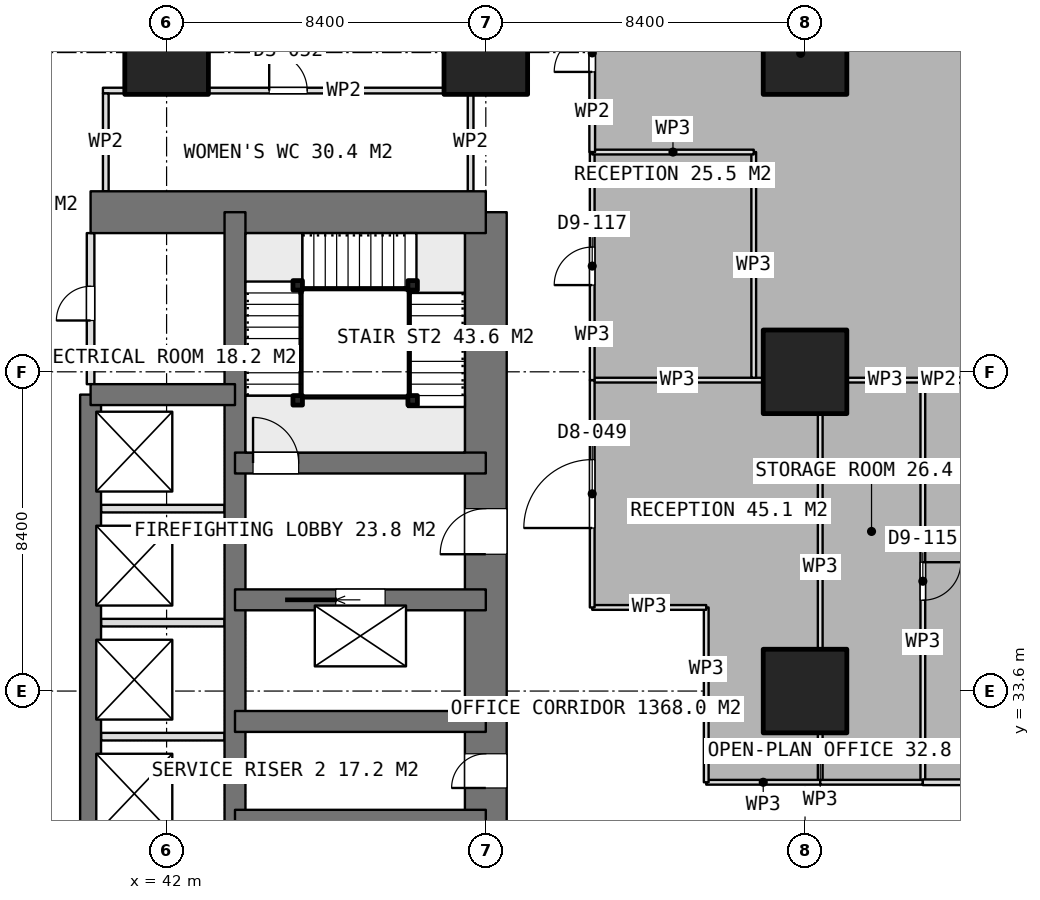
"""IFC4 building model, lengths in metres.
Left out: names, types, materials, properties, quantities, classifications, styles, units other than length and angle.
Written with IfcOpenShell. Run it as: python <this file> out.ifc"""

import sys

from ifc_helpers import new_model, si_unit, direction, frame, frame_2d, origin, origin_2d, place, context, subcontext, project, spatial, rectangle, extrude, element, fill, save


model = new_model("IFC4")
c1 = context("Model", 3, precision=1e-05, world=origin(), true_north=direction((0.0, 1.0)))
c2 = subcontext(c1, "Body", "Model", "MODEL_VIEW")
j1 = project(units=[si_unit("LENGTHUNIT", "METRE"), si_unit("PLANEANGLEUNIT", "RADIAN")], contexts=[c1])
p1 = place(None, origin())
s1 = spatial("IfcSite", under=j1, at=p1, CompositionType="ELEMENT")
p2 = place(p1, origin())
s2 = spatial("IfcBuilding", under=s1, at=p2, CompositionType="ELEMENT")
p3 = place(p2, frame((0.0, 0.0, 44.15)))
s3 = spatial("IfcBuildingStorey", under=s2, at=p3, CompositionType="ELEMENT", Elevation=44.15)
p4 = place(p3, frame((40.0, 46.2, 0.0), z_axis=(0.0, 0.0, 1.0), x_axis=(1.0, 0.0, 0.0)))
e1 = element("IfcWall", 1, at=p4, inside=s3, PredefinedType="SHEAR", context=c2, shape_type="SweptSolid", body=[
    extrude(rectangle(XDim=10.4, YDim=1.1, at=frame_2d((5.2, 0.0))), origin(), (0.0, 0.0, 1.0), 3.75),
])
p5 = place(p3, frame((50.4, 21.0, 0.0), z_axis=(0.0, 0.0, 1.0), x_axis=(0.0, 1.0, 0.0)))
e2 = element("IfcWall", 2, at=p5, inside=s3, PredefinedType="SHEAR", context=c2, shape_type="SweptSolid", body=[
    extrude(rectangle(XDim=25.2, YDim=1.1, at=frame_2d((12.6, 0.0))), origin(), (0.0, 0.0, 1.0), 3.75),
])
p6 = place(p5, frame((16.2, 0.0, 0.0)))
e3 = element("IfcOpeningElement", 3, at=p6, cuts=e2, PredefinedType="OPENING", context=c2, shape_type="SweptSolid", body=[
    extrude(rectangle(XDim=1.2, YDim=2.1, at=frame_2d((0.6, 1.05))), frame((0.0, 0.56, 0.0), z_axis=(0.0, -1.0, 0.0), x_axis=(1.0, 0.0, 0.0)), (0.0, 0.0, 1.0), 1.12),
])
p7 = place(p5, frame((10.05, 0.0, 0.0)))
e4 = element("IfcOpeningElement", 4, at=p7, cuts=e2, PredefinedType="OPENING", context=c2, shape_type="SweptSolid", body=[
    extrude(rectangle(XDim=0.9, YDim=2.1, at=frame_2d((0.45, 1.05))), frame((0.0, 0.56, 0.0), z_axis=(0.0, -1.0, 0.0), x_axis=(1.0, 0.0, 0.0)), (0.0, 0.0, 1.0), 1.12),
])
p8 = place(p5, frame((7.45, 0.0, 0.0)))
e5 = element("IfcOpeningElement", 5, at=p8, cuts=e2, PredefinedType="OPENING", context=c2, shape_type="SweptSolid", body=[
    extrude(rectangle(XDim=0.9, YDim=2.1, at=frame_2d((0.45, 1.05))), frame((0.0, 0.56, 0.0), z_axis=(0.0, -1.0, 0.0), x_axis=(1.0, 0.0, 0.0)), (0.0, 0.0, 1.0), 1.12),
])
p9 = place(p5, frame((0.75, 0.0, 0.0)))
e6 = element("IfcOpeningElement", 6, at=p9, cuts=e2, PredefinedType="OPENING", context=c2, shape_type="SweptSolid", body=[
    extrude(rectangle(XDim=1.2, YDim=2.1, at=frame_2d((0.6, 1.05))), frame((0.0, 0.56, 0.0), z_axis=(0.0, -1.0, 0.0), x_axis=(1.0, 0.0, 0.0)), (0.0, 0.0, 1.0), 1.12),
])
p10 = place(p3, frame((43.8, 21.0, 0.0), z_axis=(0.0, 0.0, 1.0), x_axis=(0.0, 1.0, 0.0)))
e7 = element("IfcWall", 7, at=p10, inside=s3, PredefinedType="SHEAR", context=c2, shape_type="SweptSolid", body=[
    extrude(rectangle(XDim=25.2, YDim=0.55, at=frame_2d((12.6, 0.0))), origin(), (0.0, 0.0, 1.0), 3.75),
])
p11 = place(p3, frame((40.0, 23.4, 0.0), z_axis=(0.0, 0.0, 1.0), x_axis=(0.0, 1.0, 0.0)))
e8 = element("IfcWall", 8, at=p11, inside=s3, PredefinedType="SHEAR", context=c2, shape_type="SweptSolid", body=[
    extrude(rectangle(XDim=18.0, YDim=0.55, at=frame_2d((9.0, 0.0))), origin(), (0.0, 0.0, 1.0), 3.75),
])
p12 = place(p3, frame((40.0, 41.4, 0.0), z_axis=(0.0, 0.0, 1.0), x_axis=(1.0, 0.0, 0.0)))
e9 = element("IfcWall", 9, at=p12, inside=s3, PredefinedType="SHEAR", context=c2, shape_type="SweptSolid", body=[
    extrude(rectangle(XDim=3.8, YDim=0.55, at=frame_2d((1.9, 0.0))), origin(), (0.0, 0.0, 1.0), 3.75),
])
for number, where, z_axis, x_axis in (
    (10, (43.8, 30.2, 0.0), (0.0, 0.0, 1.0), (1.0, 0.0, 0.0)),
    (11, (43.8, 32.8, 0.0), (0.0, 0.0, 1.0), (1.0, 0.0, 0.0)),
):
    element("IfcWall", number, at=place(p3, frame(where, z_axis=z_axis, x_axis=x_axis)), inside=s3, PredefinedType="SHEAR", context=c2, shape_type="SweptSolid", body=[
        extrude(rectangle(XDim=6.6, YDim=0.55, at=frame_2d((3.3, 0.0))), origin(), (0.0, 0.0, 1.0), 3.75),
    ])
p13 = place(p3, frame((43.8, 36.0, 0.0), z_axis=(0.0, 0.0, 1.0), x_axis=(1.0, 0.0, 0.0)))
e12 = element("IfcWall", 12, at=p13, inside=s3, PredefinedType="SHEAR", context=c2, shape_type="SweptSolid", body=[
    extrude(rectangle(XDim=6.6, YDim=0.55, at=frame_2d((3.3, 0.0))), origin(), (0.0, 0.0, 1.0), 3.75),
])
p14 = place(p13, frame((2.65, 0.0, 0.0)))
e13 = element("IfcOpeningElement", 13, at=p14, cuts=e12, PredefinedType="OPENING", context=c2, shape_type="SweptSolid", body=[
    extrude(rectangle(XDim=1.3, YDim=2.1, at=frame_2d((0.65, 1.05))), frame((0.0, 0.285, 0.0), z_axis=(0.0, -1.0, 0.0), x_axis=(1.0, 0.0, 0.0)), (0.0, 0.0, 1.0), 0.57),
])
p15 = place(p3, frame((43.8, 39.6, 0.0), z_axis=(0.0, 0.0, 1.0), x_axis=(1.0, 0.0, 0.0)))
e14 = element("IfcWall", 14, at=p15, inside=s3, PredefinedType="SHEAR", context=c2, shape_type="SweptSolid", body=[
    extrude(rectangle(XDim=6.6, YDim=0.55, at=frame_2d((3.3, 0.0))), origin(), (0.0, 0.0, 1.0), 3.75),
])
p16 = place(p15, frame((0.475, 0.0, 0.0)))
e15 = element("IfcOpeningElement", 15, at=p16, cuts=e14, PredefinedType="OPENING", context=c2, shape_type="SweptSolid", body=[
    extrude(rectangle(XDim=1.2, YDim=2.1, at=frame_2d((0.6, 1.05))), frame((0.0, 0.285, 0.0), z_axis=(0.0, -1.0, 0.0), x_axis=(1.0, 0.0, 0.0)), (0.0, 0.0, 1.0), 0.57),
])
for number, where, z_axis, x_axis in (
    (16, (42.0, 50.4, 0.0), (0.0, 0.0, 1.0), (1.0, 0.0, 0.0)),
    (17, (50.4, 50.4, 0.0), (0.0, 0.0, 1.0), (1.0, 0.0, 0.0)),
    (18, (58.8, 33.6, 0.0), (0.0, 0.0, 1.0), (1.0, 0.0, 0.0)),
    (19, (58.8, 42.0, 0.0), (0.0, 0.0, 1.0), (1.0, 0.0, 0.0)),
    (20, (58.8, 50.4, 0.0), (0.0, 0.0, 1.0), (1.0, 0.0, 0.0)),
):
    element("IfcColumn", number, at=place(p3, frame(where, z_axis=z_axis, x_axis=x_axis)), inside=s3, PredefinedType="COLUMN", context=c2, shape_type="SweptSolid", body=[
        extrude(rectangle(XDim=2.2, YDim=2.2, at=origin_2d()), origin(), (0.0, 0.0, 1.0), 3.75),
    ])
for number, where, z_axis, x_axis in (
    (21, (40.275, 32.4, 0.0), (0.0, 0.0, 1.0), (1.0, 0.0, 0.0)),
    (22, (40.275, 35.4, 0.0), (0.0, 0.0, 1.0), (1.0, 0.0, 0.0)),
    (23, (40.275, 38.4, 0.0), (0.0, 0.0, 1.0), (1.0, 0.0, 0.0)),
):
    element("IfcWall", number, at=place(p3, frame(where, z_axis=z_axis, x_axis=x_axis)), inside=s3, PredefinedType="PARTITIONING", context=c2, shape_type="SweptSolid", body=[
        extrude(rectangle(XDim=3.25, YDim=0.2, at=frame_2d((1.625, 0.0))), origin(), (0.0, 0.0, 1.0), 3.5),
    ])
p17 = place(p3, frame((40.0, 41.675, 0.0), z_axis=(0.0, 0.0, 1.0), x_axis=(0.0, 1.0, 0.0)))
e24 = element("IfcWall", 24, at=p17, inside=s3, PredefinedType="PARTITIONING", context=c2, shape_type="SweptSolid", body=[
    extrude(rectangle(XDim=3.975, YDim=0.2, at=frame_2d((1.987, 0.0))), origin(), (0.0, 0.0, 1.0), 3.5),
])
p18 = place(p17, frame((1.675, 0.0, 0.0)))
e25 = element("IfcOpeningElement", 25, at=p18, cuts=e24, PredefinedType="OPENING", context=c2, shape_type="SweptSolid", body=[
    extrude(rectangle(XDim=0.9, YDim=2.1, at=frame_2d((0.45, 1.05))), frame((0.0, 0.11, 0.0), z_axis=(0.0, -1.0, 0.0), x_axis=(1.0, 0.0, 0.0)), (0.0, 0.0, 1.0), 0.22),
])
p19 = place(p3, frame((40.325, 49.4, 0.0), z_axis=(0.0, 0.0, 1.0), x_axis=(1.0, 0.0, 0.0)))
e26 = element("IfcWall", 26, at=p19, inside=s3, PredefinedType="PARTITIONING", context=c2, shape_type="SweptSolid", body=[
    extrude(rectangle(XDim=9.75, YDim=0.15, at=frame_2d((4.875, 0.0))), origin(), (0.0, 0.0, 1.0), 3.5),
])
p20 = place(p19, frame((4.375, 0.0, 0.0)))
e27 = element("IfcOpeningElement", 27, at=p20, cuts=e26, PredefinedType="OPENING", context=c2, shape_type="SweptSolid", body=[
    extrude(rectangle(XDim=1.0, YDim=2.1, at=frame_2d((0.5, 1.05))), frame((0.0, 0.085, 0.0), z_axis=(0.0, -1.0, 0.0), x_axis=(1.0, 0.0, 0.0)), (0.0, 0.0, 1.0), 0.17),
])
for number, where, z_axis, x_axis in (
    (28, (40.4, 46.75, 0.0), (0.0, 0.0, 1.0), (0.0, 1.0, 0.0)),
    (29, (50.0, 46.75, 0.0), (0.0, 0.0, 1.0), (0.0, 1.0, 0.0)),
):
    element("IfcWall", number, at=place(p3, frame(where, z_axis=z_axis, x_axis=x_axis)), inside=s3, PredefinedType="PARTITIONING", context=c2, shape_type="SweptSolid", body=[
        extrude(rectangle(XDim=2.575, YDim=0.15, at=frame_2d((1.288, 0.0))), origin(), (0.0, 0.0, 1.0), 3.5),
    ])
p21 = place(p3, frame((53.2, 41.781, 0.0), z_axis=(0.0, 0.0, 1.0), x_axis=(1.0, 0.0, 0.0)))
e30 = element("IfcWall", 30, at=p21, inside=s3, PredefinedType="PARTITIONING", context=c2, shape_type="SweptSolid", body=[
    extrude(rectangle(XDim=4.48, YDim=0.125, at=frame_2d((2.24, 0.0))), origin(), (0.0, 0.0, 1.0), 3.5),
])
p22 = place(p3, frame((59.2, 40.88, 0.0), z_axis=(0.0, 0.0, 1.0), x_axis=(0.0, -1.0, 0.0)))
e31 = element("IfcWall", 31, at=p22, inside=s3, PredefinedType="PARTITIONING", context=c2, shape_type="SweptSolid", body=[
    extrude(rectangle(XDim=6.16, YDim=0.125, at=frame_2d((3.08, 0.0))), origin(), (0.0, 0.0, 1.0), 3.5),
])
p23 = place(p3, frame((59.2, 32.48, 0.0), z_axis=(0.0, 0.0, 1.0), x_axis=(0.0, -1.0, 0.0)))
e32 = element("IfcWall", 32, at=p23, inside=s3, PredefinedType="PARTITIONING", context=c2, shape_type="SweptSolid", body=[
    extrude(rectangle(XDim=1.28, YDim=0.125, at=frame_2d((0.64, 0.0))), origin(), (0.0, 0.0, 1.0), 3.5),
])
p24 = place(p3, frame((59.2, 31.2, 0.0), z_axis=(0.0, 0.0, 1.0), x_axis=(-1.0, 0.0, 0.0)))
e33 = element("IfcWall", 33, at=p24, inside=s3, PredefinedType="PARTITIONING", context=c2, shape_type="SweptSolid", body=[
    extrude(rectangle(XDim=3.0, YDim=0.125, at=frame_2d((1.5, 0.0))), origin(), (0.0, 0.0, 1.0), 3.5),
])
p25 = place(p3, frame((56.2, 31.2, 0.0), z_axis=(0.0, 0.0, 1.0), x_axis=(0.0, 1.0, 0.0)))
e34 = element("IfcWall", 34, at=p25, inside=s3, PredefinedType="PARTITIONING", context=c2, shape_type="SweptSolid", body=[
    extrude(rectangle(XDim=4.6, YDim=0.125, at=frame_2d((2.3, 0.0))), origin(), (0.0, 0.0, 1.0), 3.5),
])
p26 = place(p3, frame((56.2, 35.8, 0.0), z_axis=(0.0, 0.0, 1.0), x_axis=(-1.0, 0.0, 0.0)))
e35 = element("IfcWall", 35, at=p26, inside=s3, PredefinedType="PARTITIONING", context=c2, shape_type="SweptSolid", body=[
    extrude(rectangle(XDim=3.0, YDim=0.125, at=frame_2d((1.5, 0.0))), origin(), (0.0, 0.0, 1.0), 3.5),
])
p27 = place(p3, frame((53.2, 35.8, 0.0), z_axis=(0.0, 0.0, 1.0), x_axis=(0.0, 1.0, 0.0)))
e36 = element("IfcWall", 36, at=p27, inside=s3, PredefinedType="PARTITIONING", context=c2, shape_type="SweptSolid", body=[
    extrude(rectangle(XDim=5.981, YDim=0.125, at=frame_2d((2.99, 0.0))), origin(), (0.0, 0.0, 1.0), 3.5),
])
p28 = place(p27, frame((2.09, 0.0, 0.0)))
e37 = element("IfcOpeningElement", 37, at=p28, cuts=e36, PredefinedType="OPENING", context=c2, shape_type="SweptSolid", body=[
    extrude(rectangle(XDim=1.8, YDim=2.1, at=frame_2d((0.9, 1.05))), frame((0.0, 0.073, 0.0), z_axis=(0.0, -1.0, 0.0), x_axis=(1.0, 0.0, 0.0)), (0.0, 0.0, 1.0), 0.145),
])
p29 = place(p3, frame((59.92, 41.781, 0.0), z_axis=(0.0, 0.0, 1.0), x_axis=(1.0, 0.0, 0.0)))
e38 = element("IfcWall", 38, at=p29, inside=s3, PredefinedType="PARTITIONING", context=c2, shape_type="SweptSolid", body=[
    extrude(rectangle(XDim=1.98, YDim=0.125, at=frame_2d((0.99, 0.0))), origin(), (0.0, 0.0, 1.0), 3.5),
])
p30 = place(p3, frame((61.9, 41.781, 0.0), z_axis=(0.0, 0.0, 1.0), x_axis=(0.0, -1.0, 0.0)))
e39 = element("IfcWall", 39, at=p30, inside=s3, PredefinedType="PARTITIONING", context=c2, shape_type="SweptSolid", body=[
    extrude(rectangle(XDim=10.581, YDim=0.125, at=frame_2d((5.291, 0.0))), origin(), (0.0, 0.0, 1.0), 3.5),
])
p31 = place(p30, frame((4.791, 0.0, 0.0)))
e40 = element("IfcOpeningElement", 40, at=p31, cuts=e39, PredefinedType="OPENING", context=c2, shape_type="SweptSolid", body=[
    extrude(rectangle(XDim=1.0, YDim=2.1, at=frame_2d((0.5, 1.05))), frame((0.0, 0.073, 0.0), z_axis=(0.0, -1.0, 0.0), x_axis=(1.0, 0.0, 0.0)), (0.0, 0.0, 1.0), 0.145),
])
p32 = place(p3, frame((61.9, 31.2, 0.0), z_axis=(0.0, 0.0, 1.0), x_axis=(-1.0, 0.0, 0.0)))
e41 = element("IfcWall", 41, at=p32, inside=s3, PredefinedType="PARTITIONING", context=c2, shape_type="SweptSolid", body=[
    extrude(rectangle(XDim=2.7, YDim=0.125, at=frame_2d((1.35, 0.0))), origin(), (0.0, 0.0, 1.0), 3.5),
])
p33 = place(p3, frame((64.991, 31.2, 0.0), z_axis=(0.0, 0.0, 1.0), x_axis=(-1.0, 0.0, 0.0)))
e42 = element("IfcWall", 42, at=p33, inside=s3, PredefinedType="PARTITIONING", context=c2, shape_type="SweptSolid", body=[
    extrude(rectangle(XDim=3.091, YDim=0.15, at=frame_2d((1.545, 0.0))), origin(), (0.0, 0.0, 1.0), 3.5),
])
p34 = place(p3, frame((61.9, 41.781, 0.0), z_axis=(0.0, 0.0, 1.0), x_axis=(1.0, 0.0, 0.0)))
e43 = element("IfcWall", 43, at=p34, inside=s3, PredefinedType="PARTITIONING", context=c2, shape_type="SweptSolid", body=[
    extrude(rectangle(XDim=4.18, YDim=0.15, at=frame_2d((2.09, 0.0))), origin(), (0.0, 0.0, 1.0), 3.5),
])
p35 = place(p34, frame((1.555, 0.0, 0.0)))
e44 = element("IfcOpeningElement", 44, at=p35, cuts=e43, PredefinedType="OPENING", context=c2, shape_type="SweptSolid", body=[
    extrude(rectangle(XDim=1.0, YDim=2.1, at=frame_2d((0.5, 1.05))), frame((0.0, 0.085, 0.0), z_axis=(0.0, -1.0, 0.0), x_axis=(1.0, 0.0, 0.0)), (0.0, 0.0, 1.0), 0.17),
])
p36 = place(p3, frame((57.45, 47.782, 0.0), z_axis=(0.0, 0.0, 1.0), x_axis=(0.0, -1.0, 0.0)))
e45 = element("IfcWall", 45, at=p36, inside=s3, PredefinedType="PARTITIONING", context=c2, shape_type="SweptSolid", body=[
    extrude(rectangle(XDim=5.939, YDim=0.125, at=frame_2d((2.969, 0.0))), origin(), (0.0, 0.0, 1.0), 3.5),
])
p37 = place(p3, frame((53.2, 41.782, 0.0), z_axis=(0.0, 0.0, 1.0), x_axis=(0.0, 1.0, 0.0)))
e46 = element("IfcWall", 46, at=p37, inside=s3, PredefinedType="PARTITIONING", context=c2, shape_type="SweptSolid", body=[
    extrude(rectangle(XDim=6.0, YDim=0.125, at=frame_2d((3.0, 0.0))), origin(), (0.0, 0.0, 1.0), 3.5),
])
p38 = place(p37, frame((2.5, 0.0, 0.0)))
e47 = element("IfcOpeningElement", 47, at=p38, cuts=e46, PredefinedType="OPENING", context=c2, shape_type="SweptSolid", body=[
    extrude(rectangle(XDim=1.0, YDim=2.1, at=frame_2d((0.5, 1.05))), frame((0.0, 0.073, 0.0), z_axis=(0.0, -1.0, 0.0), x_axis=(1.0, 0.0, 0.0)), (0.0, 0.0, 1.0), 0.145),
])
p39 = place(p3, frame((53.2, 47.782, 0.0), z_axis=(0.0, 0.0, 1.0), x_axis=(1.0, 0.0, 0.0)))
e48 = element("IfcWall", 48, at=p39, inside=s3, PredefinedType="PARTITIONING", context=c2, shape_type="SweptSolid", body=[
    extrude(rectangle(XDim=4.25, YDim=0.125, at=frame_2d((2.125, 0.0))), origin(), (0.0, 0.0, 1.0), 3.5),
])
p40 = place(p3, frame((53.2, 47.782, 0.0), z_axis=(0.0, 0.0, 1.0), x_axis=(0.0, 1.0, 0.0)))
e49 = element("IfcWall", 49, at=p40, inside=s3, PredefinedType="PARTITIONING", context=c2, shape_type="SweptSolid", body=[
    extrude(rectangle(XDim=5.218, YDim=0.15, at=frame_2d((2.609, 0.0))), origin(), (0.0, 0.0, 1.0), 3.5),
])
p41 = place(p40, frame((2.109, 0.0, 0.0)))
e50 = element("IfcOpeningElement", 50, at=p41, cuts=e49, PredefinedType="OPENING", context=c2, shape_type="SweptSolid", body=[
    extrude(rectangle(XDim=1.0, YDim=2.1, at=frame_2d((0.5, 1.05))), frame((0.0, 0.085, 0.0), z_axis=(0.0, -1.0, 0.0), x_axis=(1.0, 0.0, 0.0)), (0.0, 0.0, 1.0), 0.17),
])
for number, where, z_axis, x_axis in (
    (51, (45.45, 41.25, 0.0), (0.0, 0.0, 1.0), (1.0, 0.0, 0.0)),
    (52, (45.45, 44.275, 0.0), (0.0, 0.0, 1.0), (1.0, 0.0, 0.0)),
    (53, (48.475, 44.275, 0.0), (0.0, 0.0, 1.0), (1.0, 0.0, 0.0)),
    (54, (48.475, 41.25, 0.0), (0.0, 0.0, 1.0), (1.0, 0.0, 0.0)),
):
    element("IfcColumn", number, at=place(p3, frame(where, z_axis=z_axis, x_axis=x_axis)), inside=s3, PredefinedType="COLUMN", context=c2, shape_type="SweptSolid", body=[
        extrude(rectangle(XDim=0.25, YDim=0.25, at=origin_2d()), origin(), (0.0, 0.0, 1.0), 3.75),
    ])
p42 = place(p6, origin())
e55 = element("IfcDoor", 55, at=p42, inside=s3, OperationType="SINGLE_SWING_LEFT", PredefinedType="DOOR", context=c2, shape_type="SweptSolid", body=[
    extrude(rectangle(XDim=1.2, YDim=2.1, at=frame_2d((0.6, 1.05))), frame((0.0, 0.025, 0.0), z_axis=(0.0, -1.0, 0.0), x_axis=(1.0, 0.0, 0.0)), (0.0, 0.0, 1.0), 0.05),
])
fill(e3, e55)
p43 = place(p7, origin())
e56 = element("IfcDoor", 56, at=p43, inside=s3, OperationType="SINGLE_SWING_LEFT", PredefinedType="DOOR", context=c2, shape_type="SweptSolid", body=[
    extrude(rectangle(XDim=0.9, YDim=2.1, at=frame_2d((0.45, 1.05))), frame((0.0, 0.025, 0.0), z_axis=(0.0, -1.0, 0.0), x_axis=(1.0, 0.0, 0.0)), (0.0, 0.0, 1.0), 0.05),
])
fill(e4, e56)
p44 = place(p18, origin())
e57 = element("IfcDoor", 57, at=p44, inside=s3, OperationType="SINGLE_SWING_LEFT", PredefinedType="DOOR", context=c2, shape_type="SweptSolid", body=[
    extrude(rectangle(XDim=0.9, YDim=2.1, at=frame_2d((0.45, 1.05))), frame((0.0, 0.025, 0.0), z_axis=(0.0, -1.0, 0.0), x_axis=(1.0, 0.0, 0.0)), (0.0, 0.0, 1.0), 0.05),
])
fill(e25, e57)
p45 = place(p14, origin())
e58 = element("IfcDoor", 58, at=p45, inside=s3, OperationType="SLIDING_TO_LEFT", PredefinedType="USERDEFINED", context=c2, shape_type="SweptSolid", body=[
    extrude(rectangle(XDim=1.3, YDim=2.1, at=frame_2d((0.65, 1.05))), frame((0.0, 0.025, 0.0), z_axis=(0.0, -1.0, 0.0), x_axis=(1.0, 0.0, 0.0)), (0.0, 0.0, 1.0), 0.05),
])
fill(e13, e58)
p46 = place(p20, origin())
e59 = element("IfcDoor", 59, at=p46, inside=s3, OperationType="SINGLE_SWING_LEFT", PredefinedType="DOOR", context=c2, shape_type="SweptSolid", body=[
    extrude(rectangle(XDim=1.0, YDim=2.1, at=frame_2d((0.5, 1.05))), frame((0.0, 0.025, 0.0), z_axis=(0.0, -1.0, 0.0), x_axis=(1.0, 0.0, 0.0)), (0.0, 0.0, 1.0), 0.05),
])
fill(e27, e59)
p47 = place(p28, origin())
e60 = element("IfcDoor", 60, at=p47, inside=s3, OperationType="DOUBLE_DOOR_SINGLE_SWING", PredefinedType="DOOR", context=c2, shape_type="SweptSolid", body=[
    extrude(rectangle(XDim=1.8, YDim=2.1, at=frame_2d((0.9, 1.05))), frame((0.0, 0.025, 0.0), z_axis=(0.0, -1.0, 0.0), x_axis=(1.0, 0.0, 0.0)), (0.0, 0.0, 1.0), 0.05),
])
fill(e37, e60)
p48 = place(p31, origin())
e61 = element("IfcDoor", 61, at=p48, inside=s3, OperationType="SINGLE_SWING_LEFT", PredefinedType="DOOR", context=c2, shape_type="SweptSolid", body=[
    extrude(rectangle(XDim=1.0, YDim=2.1, at=frame_2d((0.5, 1.05))), frame((0.0, 0.025, 0.0), z_axis=(0.0, -1.0, 0.0), x_axis=(1.0, 0.0, 0.0)), (0.0, 0.0, 1.0), 0.05),
])
fill(e40, e61)
p49 = place(p38, origin())
e62 = element("IfcDoor", 62, at=p49, inside=s3, OperationType="SINGLE_SWING_LEFT", PredefinedType="DOOR", context=c2, shape_type="SweptSolid", body=[
    extrude(rectangle(XDim=1.0, YDim=2.1, at=frame_2d((0.5, 1.05))), frame((0.0, 0.025, 0.0), z_axis=(0.0, -1.0, 0.0), x_axis=(1.0, 0.0, 0.0)), (0.0, 0.0, 1.0), 0.05),
])
fill(e47, e62)
p50 = place(p41, origin())
e63 = element("IfcDoor", 63, at=p50, inside=s3, OperationType="SINGLE_SWING_LEFT", PredefinedType="DOOR", context=c2, shape_type="SweptSolid", body=[
    extrude(rectangle(XDim=1.0, YDim=2.1, at=frame_2d((0.5, 1.05))), frame((0.0, 0.025, 0.0), z_axis=(0.0, -1.0, 0.0), x_axis=(1.0, 0.0, 0.0)), (0.0, 0.0, 1.0), 0.05),
])
fill(e50, e63)
p51 = place(p16, origin())
e64 = element("IfcDoor", 64, at=p51, inside=s3, OperationType="SINGLE_SWING_RIGHT", PredefinedType="DOOR", context=c2, shape_type="SweptSolid", body=[
    extrude(rectangle(XDim=1.2, YDim=2.1, at=frame_2d((0.6, 1.05))), frame((0.0, 0.025, 0.0), z_axis=(0.0, -1.0, 0.0), x_axis=(1.0, 0.0, 0.0)), (0.0, 0.0, 1.0), 0.05),
])
fill(e15, e64)
save(model, sys.argv[1])
